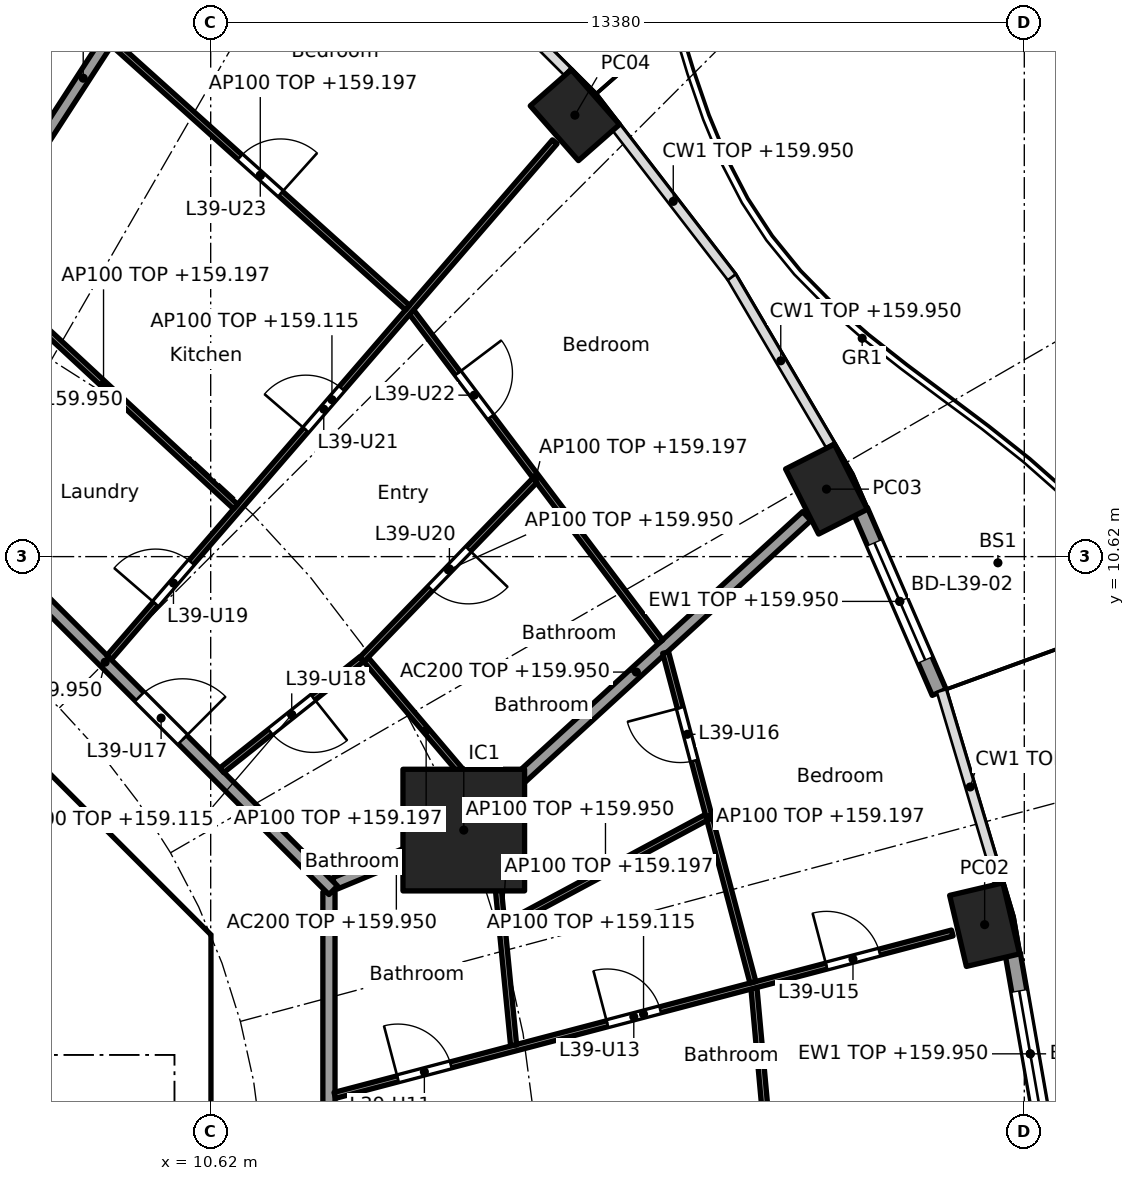
"""IFC4 building model, lengths in metres.
Left out: names, types, materials, properties, quantities, classifications, styles, units other than length and angle.
Written with IfcOpenShell. Run it as: python <this file> out.ifc"""

import sys

from ifc_helpers import new_model, si_unit, direction, frame, frame_2d, origin, origin_2d, place, context, subcontext, project, spatial, polyline, rectangle, hollow_rectangle, outline, extrude, element, fill, save


model = new_model("IFC4")
c1 = context("Model", 3, precision=1e-05, world=origin(), true_north=direction((0.0, 1.0)))
c2 = subcontext(c1, "Body", "Model", "MODEL_VIEW")
j1 = project(units=[si_unit("LENGTHUNIT", "METRE"), si_unit("PLANEANGLEUNIT", "RADIAN")], contexts=[c1])
p1 = place(None, origin())
s1 = spatial("IfcSite", under=j1, at=p1, CompositionType="ELEMENT")
p2 = place(p1, origin())
s2 = spatial("IfcBuilding", under=s1, at=p2, CompositionType="ELEMENT")
p3 = place(p2, frame((0.0, 0.0, 156.6)))
s3 = spatial("IfcBuildingStorey", under=s2, at=p3, CompositionType="ELEMENT", Elevation=156.6)
for number, where, z_axis, x_axis in (
    (1, (23.348, 4.568, 0.0), (0.0, 0.0, 1.0), (-0.229, 0.973, 0.0)),
    (2, (20.747, 11.73, 0.0), (0.0, 0.0, 1.0), (-0.452, 0.892, 0.0)),
    (3, (16.61, 17.88, 0.0), (0.0, 0.0, 1.0), (-0.66, 0.751, 0.0)),
):
    element("IfcColumn", number, at=place(p3, frame(where, z_axis=z_axis, x_axis=x_axis)), inside=s3, PredefinedType="COLUMN", context=c2, shape_type="SweptSolid", body=[
        extrude(hollow_rectangle(XDim=1.2, YDim=0.9, WallThickness=0.04, at=origin_2d()), origin(), (0.0, 0.0, 1.0), 3.7),
    ])
p4 = place(p3, frame((14.782, 6.123, 0.0), z_axis=(0.0, 0.0, 1.0), x_axis=(1.0, 0.0, 0.0)))
e4 = element("IfcColumn", 4, at=p4, inside=s3, PredefinedType="COLUMN", context=c2, shape_type="SweptSolid", body=[
    extrude(rectangle(XDim=2.0, YDim=2.0, at=origin_2d()), origin(), (0.0, 0.0, 1.0), 3.7),
])
p5 = place(p3, frame((23.811, 4.085, 0.0), z_axis=(0.0, 0.0, 1.0), x_axis=(0.172163521006, -0.985068384446, 0.0)))
e5 = element("IfcWall", 5, at=p5, inside=s3, PredefinedType="SOLIDWALL", context=c2, shape_type="SweptSolid", body=[
    extrude(rectangle(XDim=3.333, YDim=0.25, at=frame_2d((1.666, 0.0))), origin(), (0.0, 0.0, 1.0), 3.35),
])
p6 = place(p5, frame((0.616, 0.0, 0.0)))
e6 = element("IfcOpeningElement", 6, at=p6, cuts=e5, PredefinedType="OPENING", context=c2, shape_type="SweptSolid", body=[
    extrude(rectangle(XDim=2.1, YDim=2.4, at=frame_2d((1.05, 1.2))), frame((0.0, 0.135, 0.0), z_axis=(0.0, -1.0, 0.0), x_axis=(1.0, 0.0, 0.0)), (0.0, 0.0, 1.0), 0.27),
])
p7 = place(p3, frame((21.304, 11.38, 0.0), z_axis=(0.0, 0.0, 1.0), x_axis=(0.397575919276, -0.917569282622, 0.0)))
e7 = element("IfcWall", 7, at=p7, inside=s3, PredefinedType="SOLIDWALL", context=c2, shape_type="SweptSolid", body=[
    extrude(rectangle(XDim=3.261, YDim=0.25, at=frame_2d((1.63, 0.0))), origin(), (0.0, 0.0, 1.0), 3.35),
])
p8 = place(p7, frame((0.58, 0.0, 0.0)))
e8 = element("IfcOpeningElement", 8, at=p8, cuts=e7, PredefinedType="OPENING", context=c2, shape_type="SweptSolid", body=[
    extrude(rectangle(XDim=2.1, YDim=2.4, at=frame_2d((1.05, 1.2))), frame((0.0, 0.135, 0.0), z_axis=(0.0, -1.0, 0.0), x_axis=(1.0, 0.0, 0.0)), (0.0, 0.0, 1.0), 0.27),
])
p9 = place(p3, frame((9.988, 4.613, 0.0), z_axis=(0.0, 0.0, 1.0), x_axis=(-0.707106781187, 0.707106781187, 0.0)))
e9 = element("IfcWall", 9, at=p9, inside=s3, PredefinedType="SHEAR", context=c2, shape_type="SweptSolid", body=[
    extrude(rectangle(XDim=7.602, YDim=0.6, at=frame_2d((3.801, 0.0))), origin(), (0.0, 0.0, 1.0), 3.35),
])
p10 = place(p9, frame((3.201, 0.0, 0.0)))
e10 = element("IfcOpeningElement", 10, at=p10, cuts=e9, PredefinedType="OPENING", context=c2, shape_type="SweptSolid", body=[
    extrude(rectangle(XDim=1.2, YDim=2.1, at=frame_2d((0.6, 1.05))), frame((0.0, 0.31, 0.0), z_axis=(0.0, -1.0, 0.0), x_axis=(1.0, 0.0, 0.0)), (0.0, 0.0, 1.0), 0.62),
])
p11 = place(p3, frame((6.7, 4.0, 0.0), z_axis=(0.0, 0.0, 1.0), x_axis=(1.0, 0.0, 0.0)))
e11 = element("IfcWall", 11, at=p11, inside=s3, PredefinedType="SOLIDWALL", context=c2, shape_type="SweptSolid", body=[
    extrude(rectangle(XDim=3.325, YDim=0.2, at=frame_2d((1.662, 0.0))), origin(), (0.0, 0.0, 1.0), 3.35),
])
p12 = place(p11, frame((1.25, 0.0, 0.0)))
e12 = element("IfcOpeningElement", 12, at=p12, cuts=e11, PredefinedType="OPENING", context=c2, shape_type="SweptSolid", body=[
    extrude(rectangle(XDim=1.1, YDim=2.1, at=frame_2d((0.55, 1.05))), frame((0.0, 0.11, 0.0), z_axis=(0.0, -1.0, 0.0), x_axis=(1.0, 0.0, 0.0)), (0.0, 0.0, 1.0), 0.22),
])
p13 = place(p3, origin())
e13 = element("IfcWall", 13, at=p13, inside=s3, PredefinedType="SHEAR", context=c2, shape_type="SweptSolid", body=[
    extrude(outline(polyline([(9.776, -4.401), (10.025, -4.152), (10.025, -3.801), (10.025, 4.152), (9.776, 4.401), (10.2, 4.825), (10.625, 4.401), (10.625, -4.401), (10.2, -4.825), (9.776, -4.401)])), origin(), (0.0, 0.0, 1.0), 3.35),
])
p14 = place(p3, frame((12.657, 5.243, 0.0), z_axis=(0.0, 0.0, 1.0), x_axis=(0.923876145736, 0.382691608661, 0.0)))
e14 = element("IfcWall", 14, at=p14, inside=s3, PredefinedType="PARTITIONING", context=c2, shape_type="SweptSolid", body=[
    extrude(rectangle(XDim=2.2, YDim=0.2, at=frame_2d((1.1, 0.0))), origin(), (0.0, 0.0, 1.0), 3.35),
])
p15 = place(p3, frame((14.819, 6.157, 0.0), z_axis=(0.0, 0.0, 1.0), x_axis=(0.737608883396, 0.675228209671, 0.0)))
e15 = element("IfcWall", 15, at=p15, inside=s3, PredefinedType="PARTITIONING", context=c2, shape_type="SweptSolid", body=[
    extrude(rectangle(XDim=7.596, YDim=0.2, at=frame_2d((3.798, 0.0))), origin(), (0.0, 0.0, 1.0), 3.35),
])
p16 = place(p3, frame((6.15, 14.824, 0.0), z_axis=(0.0, 0.0, 1.0), x_axis=(0.543695254109, 0.839282711998, 0.0)))
e16 = element("IfcWall", 16, at=p16, inside=s3, PredefinedType="PARTITIONING", context=c2, shape_type="SweptSolid", body=[
    extrude(rectangle(XDim=8.731, YDim=0.2, at=frame_2d((4.366, 0.0))), origin(), (0.0, 0.0, 1.0), 2.597),
])
p17 = place(p3, frame((12.565, -5.104, 0.0), z_axis=(0.0, 0.0, 1.0), x_axis=(0.0, 1.0, 0.0)))
e17 = element("IfcWall", 17, at=p17, inside=s3, PredefinedType="PARTITIONING", context=c2, shape_type="SweptSolid", body=[
    extrude(rectangle(XDim=10.209, YDim=0.2, at=frame_2d((5.104, 0.0))), origin(), (0.0, 0.0, 1.0), 3.35),
])
p18 = place(p17, frame((4.604, 0.0, 0.0)))
e18 = element("IfcOpeningElement", 18, at=p18, cuts=e17, PredefinedType="OPENING", context=c2, shape_type="SweptSolid", body=[
    extrude(rectangle(XDim=1.0, YDim=2.1, at=frame_2d((0.5, 1.05))), frame((0.0, 0.11, 0.0), z_axis=(0.0, -1.0, 0.0), x_axis=(1.0, 0.0, 0.0)), (0.0, 0.0, 1.0), 0.22),
])
p19 = place(p3, frame((12.635, 5.134, 0.0), z_axis=(0.0, 0.0, 1.0), x_axis=(-0.707106781187, 0.707106781187, 0.0)))
e19 = element("IfcWall", 19, at=p19, inside=s3, PredefinedType="PARTITIONING", context=c2, shape_type="SweptSolid", body=[
    extrude(rectangle(XDim=10.609, YDim=0.2, at=frame_2d((5.305, 0.0))), origin(), (0.0, 0.0, 1.0), 3.35),
])
p20 = place(p19, frame((3.503, 0.0, 0.0)))
e20 = element("IfcOpeningElement", 20, at=p20, cuts=e19, PredefinedType="OPENING", context=c2, shape_type="SweptSolid", body=[
    extrude(rectangle(XDim=1.0, YDim=2.1, at=frame_2d((0.5, 1.05))), frame((0.0, 0.11, 0.0), z_axis=(0.0, -1.0, 0.0), x_axis=(1.0, 0.0, 0.0)), (0.0, 0.0, 1.0), 0.22),
])
p21 = place(p3, frame((20.106, -2.542, 0.0), z_axis=(0.0, 0.0, 1.0), x_axis=(-0.090571896131, 0.995889919434, 0.0)))
e21 = element("IfcWall", 21, at=p21, inside=s3, PredefinedType="PARTITIONING", context=c2, shape_type="SweptSolid", body=[
    extrude(rectangle(XDim=6.089, YDim=0.1, at=frame_2d((3.045, 0.0))), origin(), (0.0, 0.0, 1.0), 2.597),
])
p22 = place(p21, frame((2.594, 0.0, 0.0)))
e22 = element("IfcOpeningElement", 22, at=p22, cuts=e21, PredefinedType="OPENING", context=c2, shape_type="SweptSolid", body=[
    extrude(rectangle(XDim=0.9, YDim=2.1, at=frame_2d((0.45, 1.05))), frame((0.0, 0.06, 0.0), z_axis=(0.0, -1.0, 0.0), x_axis=(1.0, 0.0, 0.0)), (0.0, 0.0, 1.0), 0.12),
])
p23 = place(p3, frame((12.661, 1.76, 0.0), z_axis=(0.0, 0.0, 1.0), x_axis=(0.967120304949, 0.254319318488, 0.0)))
e23 = element("IfcWall", 23, at=p23, inside=s3, PredefinedType="PARTITIONING", context=c2, shape_type="SweptSolid", body=[
    extrude(rectangle(XDim=10.499, YDim=0.1, at=frame_2d((5.25, 0.0))), origin(), (0.0, 0.0, 1.0), 2.515),
])
p24 = place(p23, frame((1.073, 0.0, 0.0)))
e24 = element("IfcOpeningElement", 24, at=p24, cuts=e23, PredefinedType="OPENING", context=c2, shape_type="SweptSolid", body=[
    extrude(rectangle(XDim=0.9, YDim=2.1, at=frame_2d((0.45, 1.05))), frame((0.0, 0.06, 0.0), z_axis=(0.0, -1.0, 0.0), x_axis=(1.0, 0.0, 0.0)), (0.0, 0.0, 1.0), 0.12),
])
p25 = place(p23, frame((4.634, 0.0, 0.0)))
e25 = element("IfcOpeningElement", 25, at=p25, cuts=e23, PredefinedType="OPENING", context=c2, shape_type="SweptSolid", body=[
    extrude(rectangle(XDim=0.9, YDim=2.1, at=frame_2d((0.45, 1.05))), frame((0.0, 0.06, 0.0), z_axis=(0.0, -1.0, 0.0), x_axis=(1.0, 0.0, 0.0)), (0.0, 0.0, 1.0), 0.12),
])
p26 = place(p23, frame((8.361, 0.0, 0.0)))
e26 = element("IfcOpeningElement", 26, at=p26, cuts=e23, PredefinedType="OPENING", context=c2, shape_type="SweptSolid", body=[
    extrude(rectangle(XDim=0.9, YDim=2.1, at=frame_2d((0.45, 1.05))), frame((0.0, 0.06, 0.0), z_axis=(0.0, -1.0, 0.0), x_axis=(1.0, 0.0, 0.0)), (0.0, 0.0, 1.0), 0.12),
])
p27 = place(p3, frame((15.602, 2.584, 0.0), z_axis=(0.0, 0.0, 1.0), x_axis=(-0.097196343206, 0.995265226393, 0.0)))
e27 = element("IfcWall", 27, at=p27, inside=s3, PredefinedType="PARTITIONING", context=c2, shape_type="SweptSolid", body=[
    extrude(rectangle(XDim=3.856, YDim=0.1, at=frame_2d((1.928, 0.0))), origin(), (0.0, 0.0, 1.0), 2.597),
])
p28 = place(p3, frame((19.537, 3.62, 0.0), z_axis=(0.0, 0.0, 1.0), x_axis=(-0.255909310473, 0.966700793841, 0.0)))
e28 = element("IfcWall", 28, at=p28, inside=s3, PredefinedType="PARTITIONING", context=c2, shape_type="SweptSolid", body=[
    extrude(rectangle(XDim=5.609, YDim=0.1, at=frame_2d((2.804, 0.0))), origin(), (0.0, 0.0, 1.0), 2.597),
])
p29 = place(p28, frame((3.769, 0.0, 0.0)))
e29 = element("IfcOpeningElement", 29, at=p29, cuts=e28, PredefinedType="OPENING", context=c2, shape_type="SweptSolid", body=[
    extrude(rectangle(XDim=0.9, YDim=2.1, at=frame_2d((0.45, 1.05))), frame((0.0, 0.06, 0.0), z_axis=(0.0, -1.0, 0.0), x_axis=(1.0, 0.0, 0.0)), (0.0, 0.0, 1.0), 0.12),
])
p30 = place(p3, frame((15.456, 4.552, 0.0), z_axis=(0.0, 0.0, 1.0), x_axis=(0.8809418045, 0.473224615889, 0.0)))
e30 = element("IfcWall", 30, at=p30, inside=s3, PredefinedType="PARTITIONING", context=c2, shape_type="SweptSolid", body=[
    extrude(rectangle(XDim=3.76, YDim=0.1, at=frame_2d((1.88, 0.0))), origin(), (0.0, 0.0, 1.0), 3.35),
])
p31 = place(p3, frame((15.153, 6.597, 0.0), z_axis=(0.0, 0.0, 1.0), x_axis=(-0.647384064422, 0.762163941113, 0.0)))
e31 = element("IfcWall", 31, at=p31, inside=s3, PredefinedType="PARTITIONING", context=c2, shape_type="SweptSolid", body=[
    extrude(rectangle(XDim=3.057, YDim=0.1, at=frame_2d((1.528, 0.0))), origin(), (0.0, 0.0, 1.0), 2.597),
])
p32 = place(p3, frame((18.016, 9.218, 0.0), z_axis=(0.0, 0.0, 1.0), x_axis=(-0.602406473922, 0.798189476363, 0.0)))
e32 = element("IfcWall", 32, at=p32, inside=s3, PredefinedType="PARTITIONING", context=c2, shape_type="SweptSolid", body=[
    extrude(rectangle(XDim=6.794, YDim=0.1, at=frame_2d((3.397, 0.0))), origin(), (0.0, 0.0, 1.0), 2.597),
])
p33 = place(p32, frame((4.633, 0.0, 0.0)))
e33 = element("IfcOpeningElement", 33, at=p33, cuts=e32, PredefinedType="OPENING", context=c2, shape_type="SweptSolid", body=[
    extrude(rectangle(XDim=0.9, YDim=2.1, at=frame_2d((0.45, 1.05))), frame((0.0, 0.06, 0.0), z_axis=(0.0, -1.0, 0.0), x_axis=(1.0, 0.0, 0.0)), (0.0, 0.0, 1.0), 0.12),
])
p34 = place(p3, frame((10.803, 7.107, 0.0), z_axis=(0.0, 0.0, 1.0), x_axis=(0.782908385935, 0.622137010017, 0.0)))
e34 = element("IfcWall", 34, at=p34, inside=s3, PredefinedType="PARTITIONING", context=c2, shape_type="SweptSolid", body=[
    extrude(rectangle(XDim=2.937, YDim=0.1, at=frame_2d((1.469, 0.0))), origin(), (0.0, 0.0, 1.0), 2.515),
])
p35 = place(p34, frame((1.019, 0.0, 0.0)))
e35 = element("IfcOpeningElement", 35, at=p35, cuts=e34, PredefinedType="OPENING", context=c2, shape_type="SweptSolid", body=[
    extrude(rectangle(XDim=0.9, YDim=2.1, at=frame_2d((0.45, 1.05))), frame((0.0, 0.06, 0.0), z_axis=(0.0, -1.0, 0.0), x_axis=(1.0, 0.0, 0.0)), (0.0, 0.0, 1.0), 0.12),
])
p36 = place(p3, frame((13.107, 8.929, 0.0), z_axis=(0.0, 0.0, 1.0), x_axis=(0.694592384931, 0.719403515974, 0.0)))
e36 = element("IfcWall", 36, at=p36, inside=s3, PredefinedType="PARTITIONING", context=c2, shape_type="SweptSolid", body=[
    extrude(rectangle(XDim=4.094, YDim=0.1, at=frame_2d((2.047, 0.0))), origin(), (0.0, 0.0, 1.0), 3.35),
])
p37 = place(p36, frame((1.622, 0.0, 0.0)))
e37 = element("IfcOpeningElement", 37, at=p37, cuts=e36, PredefinedType="OPENING", context=c2, shape_type="SweptSolid", body=[
    extrude(rectangle(XDim=0.9, YDim=2.1, at=frame_2d((0.45, 1.05))), frame((0.0, 0.06, 0.0), z_axis=(0.0, -1.0, 0.0), x_axis=(1.0, 0.0, 0.0)), (0.0, 0.0, 1.0), 0.12),
])
p38 = place(p3, frame((8.95, 8.96, 0.0), z_axis=(0.0, 0.0, 1.0), x_axis=(0.653830241148, 0.756641272837, 0.0)))
e38 = element("IfcWall", 38, at=p38, inside=s3, PredefinedType="PARTITIONING", context=c2, shape_type="SweptSolid", body=[
    extrude(rectangle(XDim=11.208, YDim=0.1, at=frame_2d((5.604, 0.0))), origin(), (0.0, 0.0, 1.0), 2.515),
])
p39 = place(p38, frame((1.168, 0.0, 0.0)))
e39 = element("IfcOpeningElement", 39, at=p39, cuts=e38, PredefinedType="OPENING", context=c2, shape_type="SweptSolid", body=[
    extrude(rectangle(XDim=0.9, YDim=2.1, at=frame_2d((0.45, 1.05))), frame((0.0, 0.06, 0.0), z_axis=(0.0, -1.0, 0.0), x_axis=(1.0, 0.0, 0.0)), (0.0, 0.0, 1.0), 0.12),
])
p40 = place(p38, frame((4.948, 0.0, 0.0)))
e40 = element("IfcOpeningElement", 40, at=p40, cuts=e38, PredefinedType="OPENING", context=c2, shape_type="SweptSolid", body=[
    extrude(rectangle(XDim=0.9, YDim=2.1, at=frame_2d((0.45, 1.05))), frame((0.0, 0.06, 0.0), z_axis=(0.0, -1.0, 0.0), x_axis=(1.0, 0.0, 0.0)), (0.0, 0.0, 1.0), 0.12),
])
p41 = place(p3, frame((11.029, 11.443, 0.0), z_axis=(0.0, 0.0, 1.0), x_axis=(-0.733113447346, 0.680106369122, 0.0)))
e41 = element("IfcWall", 41, at=p41, inside=s3, PredefinedType="PARTITIONING", context=c2, shape_type="SweptSolid", body=[
    extrude(rectangle(XDim=5.923, YDim=0.1, at=frame_2d((2.961, 0.0))), origin(), (0.0, 0.0, 1.0), 2.597),
])
p42 = place(p3, frame((13.856, 14.714, 0.0), z_axis=(0.0, 0.0, 1.0), x_axis=(-0.743799395746, 0.668402916577, 0.0)))
e42 = element("IfcWall", 42, at=p42, inside=s3, PredefinedType="PARTITIONING", context=c2, shape_type="SweptSolid", body=[
    extrude(rectangle(XDim=6.509, YDim=0.1, at=frame_2d((3.254, 0.0))), origin(), (0.0, 0.0, 1.0), 2.597),
])
p43 = place(p42, frame((2.804, 0.0, 0.0)))
e43 = element("IfcOpeningElement", 43, at=p43, cuts=e42, PredefinedType="OPENING", context=c2, shape_type="SweptSolid", body=[
    extrude(rectangle(XDim=0.9, YDim=2.1, at=frame_2d((0.45, 1.05))), frame((0.0, 0.06, 0.0), z_axis=(0.0, -1.0, 0.0), x_axis=(1.0, 0.0, 0.0)), (0.0, 0.0, 1.0), 0.12),
])
p44 = place(p6, origin())
e44 = element("IfcDoor", 44, at=p44, inside=s3, OperationType="SLIDING_TO_LEFT", PredefinedType="DOOR", context=c2, shape_type="SweptSolid", body=[
    extrude(rectangle(XDim=2.1, YDim=2.4, at=frame_2d((1.05, 1.2))), frame((0.0, 0.025, 0.0), z_axis=(0.0, -1.0, 0.0), x_axis=(1.0, 0.0, 0.0)), (0.0, 0.0, 1.0), 0.05),
])
fill(e6, e44)
p45 = place(p8, origin())
e45 = element("IfcDoor", 45, at=p45, inside=s3, OperationType="SLIDING_TO_LEFT", PredefinedType="DOOR", context=c2, shape_type="SweptSolid", body=[
    extrude(rectangle(XDim=2.1, YDim=2.4, at=frame_2d((1.05, 1.2))), frame((0.0, 0.025, 0.0), z_axis=(0.0, -1.0, 0.0), x_axis=(1.0, 0.0, 0.0)), (0.0, 0.0, 1.0), 0.05),
])
fill(e8, e45)
p46 = place(p12, frame((1.1, 0.0, 0.0), x_axis=(-1.0, 0.0, 0.0)))
e46 = element("IfcDoor", 46, at=p46, inside=s3, OperationType="SINGLE_SWING_LEFT", PredefinedType="DOOR", context=c2, shape_type="SweptSolid", body=[
    extrude(rectangle(XDim=1.1, YDim=2.1, at=frame_2d((0.55, 1.05))), frame((0.0, 0.025, 0.0), z_axis=(0.0, -1.0, 0.0), x_axis=(1.0, 0.0, 0.0)), (0.0, 0.0, 1.0), 0.05),
])
fill(e12, e46)
p47 = place(p24, origin())
e47 = element("IfcDoor", 47, at=p47, inside=s3, OperationType="SINGLE_SWING_LEFT", PredefinedType="DOOR", context=c2, shape_type="SweptSolid", body=[
    extrude(rectangle(XDim=0.9, YDim=2.1, at=frame_2d((0.45, 1.05))), frame((0.0, 0.025, 0.0), z_axis=(0.0, -1.0, 0.0), x_axis=(1.0, 0.0, 0.0)), (0.0, 0.0, 1.0), 0.05),
])
fill(e24, e47)
p48 = place(p25, origin())
e48 = element("IfcDoor", 48, at=p48, inside=s3, OperationType="SINGLE_SWING_LEFT", PredefinedType="DOOR", context=c2, shape_type="SweptSolid", body=[
    extrude(rectangle(XDim=0.9, YDim=2.1, at=frame_2d((0.45, 1.05))), frame((0.0, 0.025, 0.0), z_axis=(0.0, -1.0, 0.0), x_axis=(1.0, 0.0, 0.0)), (0.0, 0.0, 1.0), 0.05),
])
fill(e25, e48)
p49 = place(p26, origin())
e49 = element("IfcDoor", 49, at=p49, inside=s3, OperationType="SINGLE_SWING_LEFT", PredefinedType="DOOR", context=c2, shape_type="SweptSolid", body=[
    extrude(rectangle(XDim=0.9, YDim=2.1, at=frame_2d((0.45, 1.05))), frame((0.0, 0.025, 0.0), z_axis=(0.0, -1.0, 0.0), x_axis=(1.0, 0.0, 0.0)), (0.0, 0.0, 1.0), 0.05),
])
fill(e26, e49)
p50 = place(p29, origin())
e50 = element("IfcDoor", 50, at=p50, inside=s3, OperationType="SINGLE_SWING_RIGHT", PredefinedType="DOOR", context=c2, shape_type="SweptSolid", body=[
    extrude(rectangle(XDim=0.9, YDim=2.1, at=frame_2d((0.45, 1.05))), frame((0.0, 0.025, 0.0), z_axis=(0.0, -1.0, 0.0), x_axis=(1.0, 0.0, 0.0)), (0.0, 0.0, 1.0), 0.05),
])
fill(e29, e50)
p51 = place(p20, frame((1.0, 0.0, 0.0), x_axis=(-1.0, 0.0, 0.0)))
e51 = element("IfcDoor", 51, at=p51, inside=s3, OperationType="SINGLE_SWING_RIGHT", PredefinedType="DOOR", context=c2, shape_type="SweptSolid", body=[
    extrude(rectangle(XDim=1.0, YDim=2.1, at=frame_2d((0.5, 1.05))), frame((0.0, 0.025, 0.0), z_axis=(0.0, -1.0, 0.0), x_axis=(1.0, 0.0, 0.0)), (0.0, 0.0, 1.0), 0.05),
])
fill(e20, e51)
p52 = place(p35, frame((0.9, 0.0, 0.0), x_axis=(-1.0, 0.0, 0.0)))
e52 = element("IfcDoor", 52, at=p52, inside=s3, OperationType="SINGLE_SWING_LEFT", PredefinedType="DOOR", context=c2, shape_type="SweptSolid", body=[
    extrude(rectangle(XDim=0.9, YDim=2.1, at=frame_2d((0.45, 1.05))), frame((0.0, 0.025, 0.0), z_axis=(0.0, -1.0, 0.0), x_axis=(1.0, 0.0, 0.0)), (0.0, 0.0, 1.0), 0.05),
])
fill(e35, e52)
p53 = place(p39, origin())
e53 = element("IfcDoor", 53, at=p53, inside=s3, OperationType="SINGLE_SWING_LEFT", PredefinedType="DOOR", context=c2, shape_type="SweptSolid", body=[
    extrude(rectangle(XDim=0.9, YDim=2.1, at=frame_2d((0.45, 1.05))), frame((0.0, 0.025, 0.0), z_axis=(0.0, -1.0, 0.0), x_axis=(1.0, 0.0, 0.0)), (0.0, 0.0, 1.0), 0.05),
])
fill(e39, e53)
p54 = place(p37, frame((0.9, 0.0, 0.0), x_axis=(-1.0, 0.0, 0.0)))
e54 = element("IfcDoor", 54, at=p54, inside=s3, OperationType="SINGLE_SWING_LEFT", PredefinedType="DOOR", context=c2, shape_type="SweptSolid", body=[
    extrude(rectangle(XDim=0.9, YDim=2.1, at=frame_2d((0.45, 1.05))), frame((0.0, 0.025, 0.0), z_axis=(0.0, -1.0, 0.0), x_axis=(1.0, 0.0, 0.0)), (0.0, 0.0, 1.0), 0.05),
])
fill(e37, e54)
p55 = place(p40, origin())
e55 = element("IfcDoor", 55, at=p55, inside=s3, OperationType="SINGLE_SWING_LEFT", PredefinedType="DOOR", context=c2, shape_type="SweptSolid", body=[
    extrude(rectangle(XDim=0.9, YDim=2.1, at=frame_2d((0.45, 1.05))), frame((0.0, 0.025, 0.0), z_axis=(0.0, -1.0, 0.0), x_axis=(1.0, 0.0, 0.0)), (0.0, 0.0, 1.0), 0.05),
])
fill(e40, e55)
p56 = place(p33, frame((0.9, 0.0, 0.0), x_axis=(-1.0, 0.0, 0.0)))
e56 = element("IfcDoor", 56, at=p56, inside=s3, OperationType="SINGLE_SWING_LEFT", PredefinedType="DOOR", context=c2, shape_type="SweptSolid", body=[
    extrude(rectangle(XDim=0.9, YDim=2.1, at=frame_2d((0.45, 1.05))), frame((0.0, 0.025, 0.0), z_axis=(0.0, -1.0, 0.0), x_axis=(1.0, 0.0, 0.0)), (0.0, 0.0, 1.0), 0.05),
])
fill(e33, e56)
p57 = place(p43, frame((0.9, 0.0, 0.0), x_axis=(-1.0, 0.0, 0.0)))
e57 = element("IfcDoor", 57, at=p57, inside=s3, OperationType="SINGLE_SWING_RIGHT", PredefinedType="DOOR", context=c2, shape_type="SweptSolid", body=[
    extrude(rectangle(XDim=0.9, YDim=2.1, at=frame_2d((0.45, 1.05))), frame((0.0, 0.025, 0.0), z_axis=(0.0, -1.0, 0.0), x_axis=(1.0, 0.0, 0.0)), (0.0, 0.0, 1.0), 0.05),
])
fill(e43, e57)
save(model, sys.argv[1])
